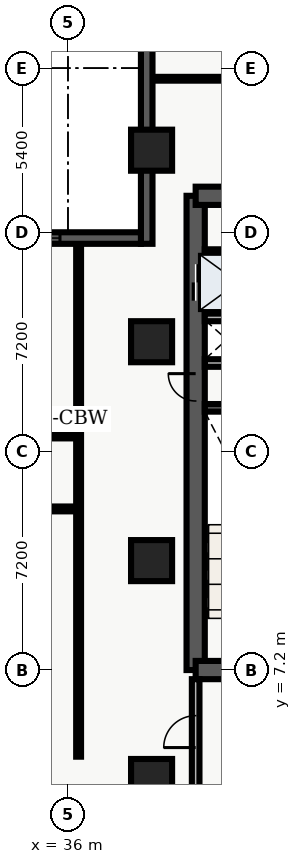
"""IFC4 building model, lengths in metres.
Left out: names, types, materials, properties, quantities, classifications, styles, units other than length and angle.
Written with IfcOpenShell. Run it as: python <this file> out.ifc"""

import sys

from ifc_helpers import new_model, entity, si_unit, converted_unit, direction, frame, origin_with_axes, origin_2d_with_axis, place, context, subcontext, project, spatial, polyline, rectangle, outline, extrude, element, fill, save


model = new_model("IFC4")
c1 = context("Model", 3, precision=1e-05, world=origin_with_axes(), true_north=direction((0.0, 1.0)))
c2 = subcontext(c1, "Body", "Model", "MODEL_VIEW")
j1 = project(units=[si_unit("LENGTHUNIT", "METRE"), converted_unit("PLANEANGLEUNIT", "DEGREE", entity("IfcPlaneAngleMeasure", 0.017), si_unit("PLANEANGLEUNIT", "RADIAN"), dimensions=[0, 0, 0, 0, 0, 0, 0])], contexts=[c1])
p1 = place(None, origin_with_axes())
s1 = spatial("IfcSite", under=j1, at=p1, CompositionType="ELEMENT")
p2 = place(p1, origin_with_axes())
s2 = spatial("IfcBuilding", under=s1, at=p2, CompositionType="ELEMENT")
p3 = place(p2, frame((0.0, 0.0, 32.7), z_axis=(0.0, 0.0, 1.0), x_axis=(1.0, 0.0, 0.0)))
s3 = spatial("IfcBuildingStorey", under=s2, at=p3, CompositionType="ELEMENT", Elevation=32.7)
p4 = place(p3, frame((40.2, 7.2, 0.0), z_axis=(0.0, 0.0, 1.0), x_axis=(0.0, 1.0, 0.0)))
e1 = element("IfcWall", 1, at=p4, inside=s3, PredefinedType="SHEAR", context=c2, shape_type="SweptSolid", body=[
    extrude(outline(polyline([(0.0, -0.3), (15.6, -0.3), (15.6, 0.3), (0.0, 0.3), (0.0, -0.3)])), origin_with_axes(), (0.0, 0.0, 1.0), 3.66),
])
p5 = place(p4, frame((12.75, 0.0, 0.0), z_axis=(0.0, 0.0, 1.0), x_axis=(1.0, 0.0, 0.0)))
e2 = element("IfcOpeningElement", 2, at=p5, cuts=e1, PredefinedType="OPENING", context=c2, shape_type="SweptSolid", body=[
    extrude(rectangle(XDim=1.2, YDim=0.62, at=origin_2d_with_axis()), origin_with_axes(), (0.0, 0.0, 1.0), 2.15),
])
p6 = place(p4, frame((9.3, 0.0, 0.0), z_axis=(0.0, 0.0, 1.0), x_axis=(1.0, 0.0, 0.0)))
e3 = element("IfcOpeningElement", 3, at=p6, cuts=e1, PredefinedType="OPENING", context=c2, shape_type="SweptSolid", body=[
    extrude(rectangle(XDim=0.9, YDim=0.62, at=origin_2d_with_axis()), origin_with_axes(), (0.0, 0.0, 1.0), 2.15),
])
p7 = place(p3, frame((40.2, 7.2, 0.0), z_axis=(0.0, 0.0, 1.0), x_axis=(1.0, 0.0, 0.0)))
e4 = element("IfcWall", 4, at=p7, inside=s3, PredefinedType="SHEAR", context=c2, shape_type="SweptSolid", body=[
    extrude(outline(polyline([(0.0, -0.3), (7.85, -0.3), (7.85, 0.3), (0.0, 0.3), (0.0, -0.3)])), origin_with_axes(), (0.0, 0.0, 1.0), 3.66),
])
p8 = place(p7, frame((2.175, 0.0, 0.0), z_axis=(0.0, 0.0, 1.0), x_axis=(1.0, 0.0, 0.0)))
e5 = element("IfcOpeningElement", 5, at=p8, cuts=e4, PredefinedType="OPENING", context=c2, shape_type="SweptSolid", body=[
    extrude(rectangle(XDim=1.05, YDim=0.62, at=origin_2d_with_axis()), origin_with_axes(), (0.0, 0.0, 1.0), 2.15),
])
p9 = place(p3, frame((40.2, 22.8, 0.0), z_axis=(0.0, 0.0, 1.0), x_axis=(1.0, 0.0, 0.0)))
e6 = element("IfcWall", 6, at=p9, inside=s3, PredefinedType="SHEAR", context=c2, shape_type="SweptSolid", body=[
    extrude(outline(polyline([(0.0, -0.3), (7.85, -0.3), (7.85, 0.3), (0.0, 0.3), (0.0, -0.3)])), origin_with_axes(), (0.0, 0.0, 1.0), 3.66),
])
p10 = place(p9, frame((5.775, 0.0, 0.0), z_axis=(0.0, 0.0, 1.0), x_axis=(1.0, 0.0, 0.0)))
e7 = element("IfcOpeningElement", 7, at=p10, cuts=e6, PredefinedType="OPENING", context=c2, shape_type="SweptSolid", body=[
    extrude(rectangle(XDim=1.05, YDim=0.62, at=origin_2d_with_axis()), origin_with_axes(), (0.0, 0.0, 1.0), 2.15),
])
p11 = place(p9, frame((2.15, 0.0, 0.0), z_axis=(0.0, 0.0, 1.0), x_axis=(1.0, 0.0, 0.0)))
e8 = element("IfcOpeningElement", 8, at=p11, cuts=e6, PredefinedType="OPENING", context=c2, shape_type="SweptSolid", body=[
    extrude(rectangle(XDim=0.9, YDim=0.62, at=origin_2d_with_axis()), origin_with_axes(), (0.0, 0.0, 1.0), 2.15),
])
p12 = place(p3, frame((40.5, 15.825, 0.0), z_axis=(0.0, 0.0, 1.0), x_axis=(1.0, 0.0, 0.0)))
e9 = element("IfcWall", 9, at=p12, inside=s3, PredefinedType="SHEAR", context=c2, shape_type="SweptSolid", body=[
    extrude(outline(polyline([(0.0, -0.125), (3.5, -0.125), (3.5, 0.125), (0.0, 0.125), (0.0, -0.125)])), origin_with_axes(), (0.0, 0.0, 1.0), 3.66),
])
p13 = place(p3, frame((40.5, 17.3, 0.0), z_axis=(0.0, 0.0, 1.0), x_axis=(1.0, 0.0, 0.0)))
e10 = element("IfcWall", 10, at=p13, inside=s3, PredefinedType="SOLIDWALL", context=c2, shape_type="SweptSolid", body=[
    extrude(outline(polyline([(0.0, -0.125), (3.5, -0.125), (3.5, 0.125), (0.0, 0.125), (0.0, -0.125)])), origin_with_axes(), (0.0, 0.0, 1.0), 2.7),
])
p14 = place(p13, frame((2.4, 0.0, 0.0), z_axis=(0.0, 0.0, 1.0), x_axis=(1.0, 0.0, 0.0)))
e11 = element("IfcOpeningElement", 11, at=p14, cuts=e10, PredefinedType="OPENING", context=c2, shape_type="SweptSolid", body=[
    extrude(rectangle(XDim=0.9, YDim=0.27, at=origin_2d_with_axis()), origin_with_axes(), (0.0, 0.0, 1.0), 2.15),
])
p15 = place(p3, frame((40.5, 18.8, 0.0), z_axis=(0.0, 0.0, 1.0), x_axis=(1.0, 0.0, 0.0)))
e12 = element("IfcWall", 12, at=p15, inside=s3, PredefinedType="SOLIDWALL", context=c2, shape_type="SweptSolid", body=[
    extrude(outline(polyline([(0.0, -0.125), (3.5, -0.125), (3.5, 0.125), (0.0, 0.125), (0.0, -0.125)])), origin_with_axes(), (0.0, 0.0, 1.0), 2.7),
])
p16 = place(p3, frame((40.2, 3.1, 0.0), z_axis=(0.0, 0.0, 1.0), x_axis=(0.0, 1.0, 0.0)))
e13 = element("IfcWall", 13, at=p16, inside=s3, PredefinedType="SOLIDWALL", context=c2, shape_type="SweptSolid", body=[
    extrude(outline(polyline([(0.0, -0.125), (3.8, -0.125), (3.8, 0.125), (0.0, 0.125), (0.0, -0.125)])), origin_with_axes(), (0.0, 0.0, 1.0), 2.7),
])
p17 = place(p16, frame((2.075, 0.0, 0.0), z_axis=(0.0, 0.0, 1.0), x_axis=(1.0, 0.0, 0.0)))
e14 = element("IfcOpeningElement", 14, at=p17, cuts=e13, PredefinedType="OPENING", context=c2, shape_type="SweptSolid", body=[
    extrude(rectangle(XDim=1.05, YDim=0.27, at=origin_2d_with_axis()), origin_with_axes(), (0.0, 0.0, 1.0), 2.15),
])
for number, where, z_axis, x_axis in (
    (15, (38.75, 3.6, 0.0), (0.0, 0.0, 1.0), (1.0, 0.0, 0.0)),
    (16, (38.75, 10.8, 0.0), (0.0, 0.0, 1.0), (1.0, 0.0, 0.0)),
    (17, (38.75, 18.0, 0.0), (0.0, 0.0, 1.0), (1.0, 0.0, 0.0)),
    (18, (38.75, 24.3, 0.0), (0.0, 0.0, 1.0), (1.0, 0.0, 0.0)),
):
    element("IfcColumn", number, at=place(p3, frame(where, z_axis=z_axis, x_axis=x_axis)), inside=s3, PredefinedType="COLUMN", context=c2, shape_type="SweptSolid", body=[
        extrude(rectangle(XDim=1.35, YDim=1.35, at=origin_2d_with_axis()), origin_with_axes(), (0.0, 0.0, 1.0), 3.9),
    ])
p18 = place(p3, frame((40.5, 20.96, 0.0), z_axis=(0.0, 0.0, 1.0), x_axis=(1.0, 0.0, 0.0)))
e19 = element("IfcWall", 19, at=p18, inside=s3, PredefinedType="PARTITIONING", context=c2, shape_type="SweptSolid", body=[
    extrude(outline(polyline([(0.0, -0.08), (3.5, -0.08), (3.5, 0.08), (0.0, 0.08), (0.0, -0.08)])), origin_with_axes(), (0.0, 0.0, 1.0), 2.7),
])
p19 = place(p3, frame((21.15, 12.5, 0.0), z_axis=(0.0, 0.0, 1.0), x_axis=(1.0, 0.0, 0.0)))
e20 = element("IfcWall", 20, at=p19, inside=s3, PredefinedType="PARTITIONING", context=c2, shape_type="SweptSolid", body=[
    extrude(outline(polyline([(0.0, -0.08), (15.2, -0.08), (15.2, 0.08), (0.0, 0.08), (0.0, -0.08)])), origin_with_axes(), (0.0, 0.0, 1.0), 2.7),
])
p20 = place(p19, frame((3.595, 0.0, 0.0), z_axis=(0.0, 0.0, 1.0), x_axis=(1.0, 0.0, 0.0)))
e21 = element("IfcOpeningElement", 21, at=p20, cuts=e20, PredefinedType="OPENING", context=c2, shape_type="SweptSolid", body=[
    extrude(rectangle(XDim=1.0, YDim=0.18, at=origin_2d_with_axis()), origin_with_axes(), (0.0, 0.0, 1.0), 2.15),
])
p21 = place(p19, frame((11.065, 0.0, 0.0), z_axis=(0.0, 0.0, 1.0), x_axis=(1.0, 0.0, 0.0)))
e22 = element("IfcOpeningElement", 22, at=p21, cuts=e20, PredefinedType="OPENING", context=c2, shape_type="SweptSolid", body=[
    extrude(rectangle(XDim=1.2, YDim=0.18, at=origin_2d_with_axis()), origin_with_axes(), (0.0, 0.0, 1.0), 2.2),
])
p22 = place(p3, frame((21.15, 14.9, 0.0), z_axis=(0.0, 0.0, 1.0), x_axis=(1.0, 0.0, 0.0)))
e23 = element("IfcWall", 23, at=p22, inside=s3, PredefinedType="PARTITIONING", context=c2, shape_type="SweptSolid", body=[
    extrude(outline(polyline([(0.0, -0.08), (15.2, -0.08), (15.2, 0.08), (0.0, 0.08), (0.0, -0.08)])), origin_with_axes(), (0.0, 0.0, 1.0), 2.7),
])
p23 = place(p22, frame((3.491, 0.0, 0.0), z_axis=(0.0, 0.0, 1.0), x_axis=(1.0, 0.0, 0.0)))
e24 = element("IfcOpeningElement", 24, at=p23, cuts=e23, PredefinedType="OPENING", context=c2, shape_type="SweptSolid", body=[
    extrude(rectangle(XDim=1.0, YDim=0.18, at=origin_2d_with_axis()), origin_with_axes(), (0.0, 0.0, 1.0), 2.15),
])
p24 = place(p22, frame((10.961, 0.0, 0.0), z_axis=(0.0, 0.0, 1.0), x_axis=(1.0, 0.0, 0.0)))
e25 = element("IfcOpeningElement", 25, at=p24, cuts=e23, PredefinedType="OPENING", context=c2, shape_type="SweptSolid", body=[
    extrude(rectangle(XDim=1.0, YDim=0.18, at=origin_2d_with_axis()), origin_with_axes(), (0.0, 0.0, 1.0), 2.15),
])
p25 = place(p3, frame((36.35, 4.35, 0.0), z_axis=(0.0, 0.0, 1.0), x_axis=(0.0, 1.0, 0.0)))
e26 = element("IfcWall", 26, at=p25, inside=s3, PredefinedType="PARTITIONING", context=c2, shape_type="SweptSolid", body=[
    extrude(outline(polyline([(0.0, -0.08), (16.95, -0.08), (16.95, 0.08), (0.0, 0.08), (0.0, -0.08)])), origin_with_axes(), (0.0, 0.0, 1.0), 2.7),
])
p26 = place(p3, frame((38.76, 26.65, 0.0), z_axis=(0.0, 0.0, 1.0), x_axis=(1.0, 0.0, 0.0)))
e27 = element("IfcWall", 27, at=p26, inside=s3, PredefinedType="PARTITIONING", context=c2, shape_type="SweptSolid", body=[
    extrude(outline(polyline([(0.0, -0.062), (20.88, -0.062), (20.88, 0.062), (0.0, 0.062), (0.0, -0.062)])), origin_with_axes(), (0.0, 0.0, 1.0), 2.7),
])
p27 = place(p26, frame((4.24, 0.0, 0.0), z_axis=(0.0, 0.0, 1.0), x_axis=(1.0, 0.0, 0.0)))
e28 = element("IfcOpeningElement", 28, at=p27, cuts=e27, PredefinedType="OPENING", context=c2, shape_type="SweptSolid", body=[
    extrude(rectangle(XDim=1.0, YDim=0.145, at=origin_2d_with_axis()), origin_with_axes(), (0.0, 0.0, 1.0), 2.15),
])
p28 = place(p3, frame((38.59, 21.22, 0.0), z_axis=(0.0, 0.0, 1.0), x_axis=(0.0, 1.0, 0.0)))
e29 = element("IfcWall", 29, at=p28, inside=s3, PredefinedType="SOLIDWALL", context=c2, shape_type="SweptSolid", body=[
    extrude(outline(polyline([(0.0, -0.19), (7.58, -0.19), (7.58, 0.19), (0.0, 0.19), (0.0, -0.19)])), origin_with_axes(), (0.0, 0.0, 1.0), 3.66),
])
p29 = place(p3, frame((21.22, 21.41, 0.0), z_axis=(0.0, 0.0, 1.0), x_axis=(1.0, 0.0, 0.0)))
e30 = element("IfcWall", 30, at=p29, inside=s3, PredefinedType="SOLIDWALL", context=c2, shape_type="SweptSolid", body=[
    extrude(outline(polyline([(0.0, -0.19), (17.18, -0.19), (17.18, 0.19), (0.0, 0.19), (0.0, -0.19)])), origin_with_axes(), (0.0, 0.0, 1.0), 3.66),
])
p30 = place(p29, frame((3.263, 0.0, 0.45), z_axis=(0.0, 0.0, 1.0), x_axis=(1.0, 0.0, 0.0)))
e31 = element("IfcOpeningElement", 31, at=p30, cuts=e30, PredefinedType="OPENING", context=c2, shape_type="SweptSolid", body=[
    extrude(rectangle(XDim=2.1, YDim=0.4, at=origin_2d_with_axis()), origin_with_axes(), (0.0, 0.0, 1.0), 2.2),
])
p31 = place(p29, frame((8.59, 0.0, 0.45), z_axis=(0.0, 0.0, 1.0), x_axis=(1.0, 0.0, 0.0)))
e32 = element("IfcOpeningElement", 32, at=p31, cuts=e30, PredefinedType="OPENING", context=c2, shape_type="SweptSolid", body=[
    extrude(rectangle(XDim=2.1, YDim=0.4, at=origin_2d_with_axis()), origin_with_axes(), (0.0, 0.0, 1.0), 2.2),
])
p32 = place(p29, frame((13.467, 0.0, 0.45), z_axis=(0.0, 0.0, 1.0), x_axis=(1.0, 0.0, 0.0)))
e33 = element("IfcOpeningElement", 33, at=p32, cuts=e30, PredefinedType="OPENING", context=c2, shape_type="SweptSolid", body=[
    extrude(rectangle(XDim=2.1, YDim=0.4, at=origin_2d_with_axis()), origin_with_axes(), (0.0, 0.0, 1.0), 2.2),
])
p33 = place(p4, frame((12.75, 0.0, 0.0), z_axis=(0.0, 0.0, 1.0), x_axis=(1.0, 0.0, 0.0)))
e34 = element("IfcDoor", 34, at=p33, inside=s3, OperationType="DOUBLE_DOOR_SLIDING", PredefinedType="DOOR", context=c2, shape_type="SweptSolid", body=[
    extrude(rectangle(XDim=1.2, YDim=0.09, at=origin_2d_with_axis()), origin_with_axes(), (0.0, 0.0, 1.0), 2.15),
])
fill(e2, e34)
p34 = place(p4, frame((9.3, 0.0, 0.0), z_axis=(0.0, 0.0, 1.0), x_axis=(1.0, 0.0, 0.0)))
e35 = element("IfcDoor", 35, at=p34, inside=s3, OperationType="SINGLE_SWING_RIGHT", PredefinedType="DOOR", context=c2, shape_type="SweptSolid", body=[
    extrude(rectangle(XDim=0.9, YDim=0.09, at=origin_2d_with_axis()), origin_with_axes(), (0.0, 0.0, 1.0), 2.15),
])
fill(e3, e35)
p35 = place(p16, frame((2.075, 0.0, 0.0), z_axis=(0.0, 0.0, 1.0), x_axis=(1.0, 0.0, 0.0)))
e36 = element("IfcDoor", 36, at=p35, inside=s3, OperationType="SINGLE_SWING_LEFT", PredefinedType="DOOR", context=c2, shape_type="SweptSolid", body=[
    extrude(rectangle(XDim=1.05, YDim=0.09, at=origin_2d_with_axis()), origin_with_axes(), (0.0, 0.0, 1.0), 2.15),
])
fill(e14, e36)
p36 = place(p29, frame((13.467, 0.0, 0.45), z_axis=(0.0, 0.0, 1.0), x_axis=(1.0, 0.0, 0.0)))
e37 = element("IfcWindow", 37, at=p36, inside=s3, PredefinedType="WINDOW", context=c2, shape_type="SweptSolid", body=[
    extrude(rectangle(XDim=2.1, YDim=0.09, at=origin_2d_with_axis()), origin_with_axes(), (0.0, 0.0, 1.0), 2.2),
])
fill(e33, e37)
save(model, sys.argv[1])
